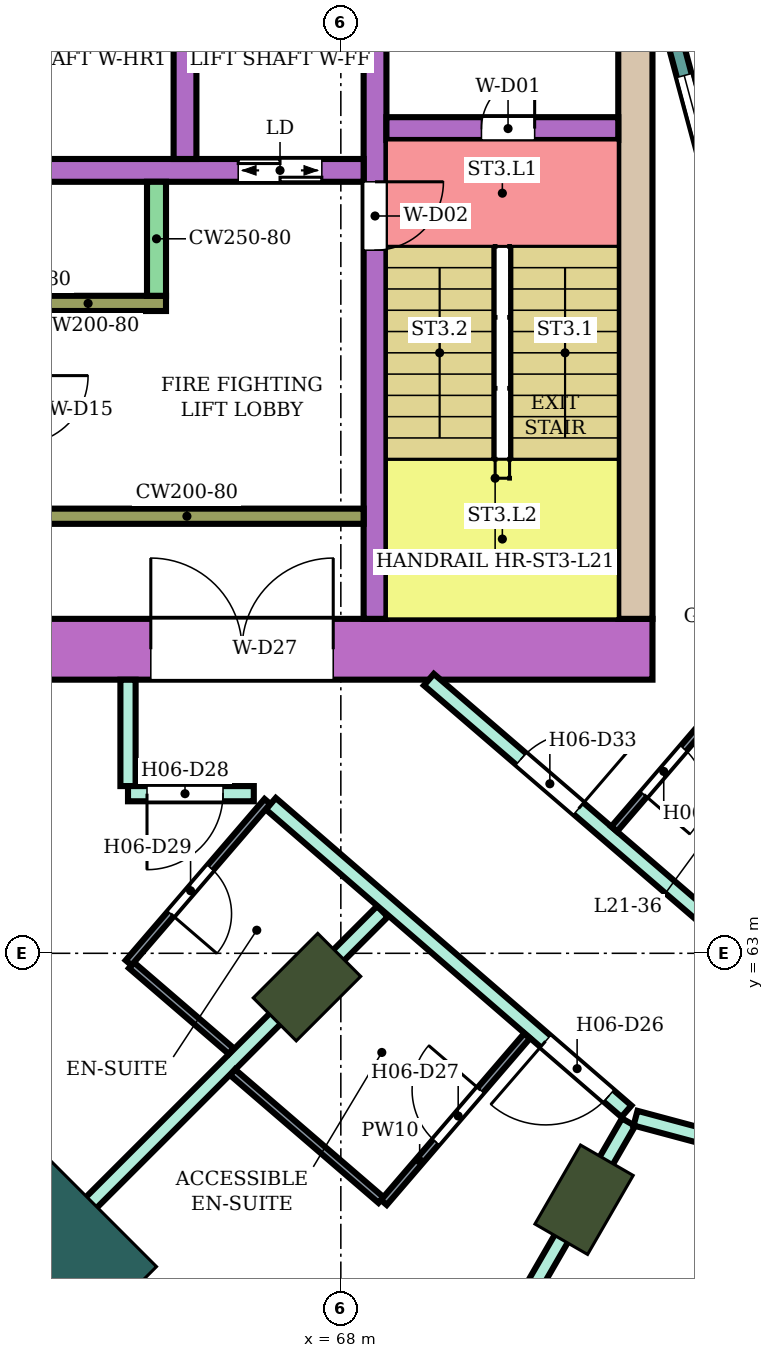
"""IFC4 building model, lengths in metres.
Left out: names, types, materials, properties, quantities, classifications, styles, units other than length and angle.
Written with IfcOpenShell. Run it as: python <this file> out.ifc"""

import sys

from ifc_helpers import new_model, si_unit, direction, frame, frame_2d, origin, origin_2d, place, context, subcontext, project, spatial, rectangle, extrude, element, fill, save


model = new_model("IFC4")
c1 = context("Model", 3, precision=1e-05, world=origin(), true_north=direction((0.0, 1.0)))
c2 = subcontext(c1, "Body", "Model", "MODEL_VIEW")
j1 = project(units=[si_unit("LENGTHUNIT", "METRE"), si_unit("PLANEANGLEUNIT", "RADIAN")], contexts=[c1])
p1 = place(None, origin())
s1 = spatial("IfcSite", under=j1, at=p1, CompositionType="ELEMENT")
p2 = place(p1, origin())
s2 = spatial("IfcBuilding", under=s1, at=p2, CompositionType="ELEMENT")
p3 = place(p2, frame((0.0, 0.0, 93.8)))
s3 = spatial("IfcBuildingStorey", under=s2, at=p3, CompositionType="ELEMENT", Elevation=93.8)
for number, where, z_axis, x_axis in (
    (1, (67.555, 62.555, 0.0), (0.0, 0.0, 1.0), (-0.707, -0.707, 0.0)),
    (2, (71.2, 59.758, 0.0), (0.0, 0.0, 1.0), (-0.5, -0.866, 0.0)),
):
    element("IfcColumn", number, at=place(p3, frame(where, z_axis=z_axis, x_axis=x_axis)), inside=s3, PredefinedType="COLUMN", context=c2, shape_type="SweptSolid", body=[
        extrude(rectangle(XDim=1.2, YDim=0.8, at=origin_2d()), origin(), (0.0, 0.0, 1.0), 3.8),
    ])
p4 = place(p3, frame((64.09, 59.09, 0.0), z_axis=(0.0, 0.0, 1.0), x_axis=(-0.707106781187, -0.707106781187, 0.0)))
e3 = element("IfcColumn", 3, at=p4, inside=s3, PredefinedType="COLUMN", context=c2, shape_type="SweptSolid", body=[
    extrude(rectangle(XDim=1.8, YDim=2.4, at=origin_2d()), origin(), (0.0, 0.0, 1.0), 3.8),
])
p5 = place(p3, frame((72.1, 67.0, 0.0), z_axis=(0.0, 0.0, 1.0), x_axis=(-1.0, 0.0, 0.0)))
e4 = element("IfcWall", 4, at=p5, inside=s3, PredefinedType="SHEAR", context=c2, shape_type="SweptSolid", body=[
    extrude(rectangle(XDim=14.7, YDim=0.8, at=frame_2d((7.35, 0.0))), origin(), (0.0, 0.0, 1.0), 3.48),
])
p6 = place(p5, frame((4.2, 0.0, 0.0)))
e5 = element("IfcOpeningElement", 5, at=p6, cuts=e4, PredefinedType="OPENING", context=c2, shape_type="SweptSolid", body=[
    extrude(rectangle(XDim=2.4, YDim=2.4, at=frame_2d((1.2, 1.2))), frame((0.0, 0.41, 0.0), z_axis=(0.0, -1.0, 0.0), x_axis=(1.0, 0.0, 0.0)), (0.0, 0.0, 1.0), 0.82),
])
p7 = place(p3, frame((71.875, 75.0, 0.0), z_axis=(0.0, 0.0, 1.0), x_axis=(0.0, -1.0, 0.0)))
e6 = element("IfcWall", 6, at=p7, inside=s3, PredefinedType="SHEAR", context=c2, shape_type="SweptSolid", body=[
    extrude(rectangle(XDim=7.6, YDim=0.45, at=frame_2d((3.8, 0.0))), origin(), (0.0, 0.0, 1.0), 3.48),
])
p8 = place(p3, frame((68.45, 75.0, 0.0), z_axis=(0.0, 0.0, 1.0), x_axis=(0.0, -1.0, 0.0)))
e7 = element("IfcWall", 7, at=p8, inside=s3, PredefinedType="SHEAR", context=c2, shape_type="SweptSolid", body=[
    extrude(rectangle(XDim=7.6, YDim=0.3, at=frame_2d((3.8, 0.0))), origin(), (0.0, 0.0, 1.0), 3.48),
])
p9 = place(p8, frame((1.85, 0.0, 0.0)))
e8 = element("IfcOpeningElement", 8, at=p9, cuts=e7, PredefinedType="OPENING", context=c2, shape_type="SweptSolid", body=[
    extrude(rectangle(XDim=0.9, YDim=2.1, at=frame_2d((0.45, 1.05))), frame((0.0, 0.16, 0.0), z_axis=(0.0, -1.0, 0.0), x_axis=(1.0, 0.0, 0.0)), (0.0, 0.0, 1.0), 0.32),
])
p10 = place(p3, frame((71.65, 73.85, 0.0), z_axis=(0.0, 0.0, 1.0), x_axis=(-1.0, 0.0, 0.0)))
e9 = element("IfcWall", 9, at=p10, inside=s3, PredefinedType="SHEAR", context=c2, shape_type="SweptSolid", body=[
    extrude(rectangle(XDim=3.05, YDim=0.3, at=frame_2d((1.525, 0.0))), origin(), (0.0, 0.0, 1.0), 3.48),
])
p11 = place(p10, frame((1.1, 0.0, 0.0)))
e10 = element("IfcOpeningElement", 10, at=p11, cuts=e9, PredefinedType="OPENING", context=c2, shape_type="SweptSolid", body=[
    extrude(rectangle(XDim=0.7, YDim=2.0, at=frame_2d((0.35, 1.0))), frame((0.0, 0.16, 0.0), z_axis=(0.0, -1.0, 0.0), x_axis=(1.0, 0.0, 0.0)), (0.0, 0.0, 1.0), 0.32),
])
p12 = place(p3, frame((68.3, 73.3, 0.0), z_axis=(0.0, 0.0, 1.0), x_axis=(-1.0, 0.0, 0.0)))
e11 = element("IfcWall", 11, at=p12, inside=s3, PredefinedType="SHEAR", context=c2, shape_type="SweptSolid", body=[
    extrude(rectangle(XDim=10.9, YDim=0.3, at=frame_2d((5.45, 0.0))), origin(), (0.0, 0.0, 1.0), 3.48),
])
p13 = place(p12, frame((0.55, 0.0, 0.0)))
e12 = element("IfcOpeningElement", 12, at=p13, cuts=e11, PredefinedType="OPENING", context=c2, shape_type="SweptSolid", body=[
    extrude(rectangle(XDim=1.1, YDim=2.1, at=frame_2d((0.55, 1.05))), frame((0.0, 0.16, 0.0), z_axis=(0.0, -1.0, 0.0), x_axis=(1.0, 0.0, 0.0)), (0.0, 0.0, 1.0), 0.32),
])
p14 = place(p12, frame((8.1, 0.0, 0.0)))
e13 = element("IfcOpeningElement", 13, at=p14, cuts=e11, PredefinedType="OPENING", context=c2, shape_type="SweptSolid", body=[
    extrude(rectangle(XDim=1.0, YDim=2.1, at=frame_2d((0.5, 1.05))), frame((0.0, 0.16, 0.0), z_axis=(0.0, -1.0, 0.0), x_axis=(1.0, 0.0, 0.0)), (0.0, 0.0, 1.0), 0.32),
])
p15 = place(p3, frame((65.95, 76.0, 0.0), z_axis=(0.0, 0.0, 1.0), x_axis=(0.0, -1.0, 0.0)))
e14 = element("IfcWall", 14, at=p15, inside=s3, PredefinedType="SHEAR", context=c2, shape_type="SweptSolid", body=[
    extrude(rectangle(XDim=2.55, YDim=0.3, at=frame_2d((1.275, 0.0))), origin(), (0.0, 0.0, 1.0), 3.48),
])
p16 = place(p3, frame((68.3, 68.75, 0.0), z_axis=(0.0, 0.0, 1.0), x_axis=(-1.0, 0.0, 0.0)))
e15 = element("IfcWall", 15, at=p16, inside=s3, PredefinedType="SHEAR", context=c2, shape_type="SweptSolid", body=[
    extrude(rectangle(XDim=4.65, YDim=0.2, at=frame_2d((2.325, 0.0))), origin(), (0.0, 0.0, 1.0), 3.48),
])
p17 = place(p3, frame((65.7, 71.55, 0.0), z_axis=(0.0, 0.0, 1.0), x_axis=(-1.0, 0.0, 0.0)))
e16 = element("IfcWall", 16, at=p17, inside=s3, PredefinedType="SHEAR", context=c2, shape_type="SweptSolid", body=[
    extrude(rectangle(XDim=2.05, YDim=0.2, at=frame_2d((1.025, 0.0))), origin(), (0.0, 0.0, 1.0), 3.48),
])
p18 = place(p3, frame((65.575, 73.15, 0.0), z_axis=(0.0, 0.0, 1.0), x_axis=(0.0, -1.0, 0.0)))
e17 = element("IfcWall", 17, at=p18, inside=s3, PredefinedType="SHEAR", context=c2, shape_type="SweptSolid", body=[
    extrude(rectangle(XDim=1.5, YDim=0.25, at=frame_2d((0.75, 0.0))), origin(), (0.0, 0.0, 1.0), 3.48),
])
p19 = place(p3, frame((72.396, 75.0, 0.0), z_axis=(0.0, 0.0, 1.0), x_axis=(0.258789828301, -0.965933654434, 0.0)))
e18 = element("IfcWall", 18, at=p19, inside=s3, PredefinedType="NOTDEFINED", context=c2, shape_type="SweptSolid", body=[
    extrude(rectangle(XDim=3.936, YDim=0.2, at=frame_2d((1.968, 0.0))), origin(), (0.0, 0.0, 1.0), 3.8),
])
p20 = place(p19, frame((0.468, 0.0, 0.9)))
e19 = element("IfcOpeningElement", 19, at=p20, cuts=e18, PredefinedType="OPENING", context=c2, shape_type="SweptSolid", body=[
    extrude(rectangle(XDim=3.0, YDim=2.3, at=frame_2d((1.5, 1.15))), frame((0.0, 0.11, 0.0), z_axis=(0.0, -1.0, 0.0), x_axis=(1.0, 0.0, 0.0)), (0.0, 0.0, 1.0), 0.22),
])
p21 = place(p3, frame((63.594, 58.598, 0.0), z_axis=(0.0, 0.0, 1.0), x_axis=(0.707228748718, 0.706984792613, 0.0)))
e20 = element("IfcWall", 20, at=p21, inside=s3, PredefinedType="PARTITIONING", context=c2, shape_type="SweptSolid", body=[
    extrude(rectangle(XDim=7.005, YDim=0.2, at=frame_2d((3.503, 0.0))), origin(), (0.0, 0.0, 1.0), 3.35),
])
p22 = place(p3, frame((65.2, 65.2, 0.0), z_axis=(0.0, 0.0, 1.0), x_axis=(0.0, 1.0, 0.0)))
e21 = element("IfcWall", 21, at=p22, inside=s3, PredefinedType="PARTITIONING", context=c2, shape_type="SweptSolid", body=[
    extrude(rectangle(XDim=1.399, YDim=0.2, at=frame_2d((0.7, 0.0))), origin(), (0.0, 0.0, 1.0), 3.35),
])
p23 = place(p3, frame((65.2, 65.1, 0.0), z_axis=(0.0, 0.0, 1.0), x_axis=(1.0, 0.0, 0.0)))
e22 = element("IfcWall", 22, at=p23, inside=s3, PredefinedType="PARTITIONING", context=c2, shape_type="SweptSolid", body=[
    extrude(rectangle(XDim=1.655, YDim=0.2, at=frame_2d((0.828, 0.0))), origin(), (0.0, 0.0, 1.0), 3.35),
])
p24 = place(p23, frame((0.25, 0.0, 0.0)))
e23 = element("IfcOpeningElement", 23, at=p24, cuts=e22, PredefinedType="OPENING", context=c2, shape_type="SweptSolid", body=[
    extrude(rectangle(XDim=1.0, YDim=2.1, at=frame_2d((0.5, 1.05))), frame((0.0, 0.11, 0.0), z_axis=(0.0, -1.0, 0.0), x_axis=(1.0, 0.0, 0.0)), (0.0, 0.0, 1.0), 0.22),
])
p25 = place(p3, frame((67.079, 64.968, 0.0), z_axis=(0.0, 0.0, 1.0), x_axis=(0.756371089567, -0.654142778656, 0.0)))
e24 = element("IfcWall", 24, at=p25, inside=s3, PredefinedType="PARTITIONING", context=c2, shape_type="SweptSolid", body=[
    extrude(rectangle(XDim=6.185, YDim=0.2, at=frame_2d((3.093, 0.0))), origin(), (0.0, 0.0, 1.0), 3.35),
])
p26 = place(p25, frame((4.778, 0.0, 0.0)))
e25 = element("IfcOpeningElement", 25, at=p26, cuts=e24, PredefinedType="OPENING", context=c2, shape_type="SweptSolid", body=[
    extrude(rectangle(XDim=1.1, YDim=2.1, at=frame_2d((0.55, 1.05))), frame((0.0, 0.11, 0.0), z_axis=(0.0, -1.0, 0.0), x_axis=(1.0, 0.0, 0.0)), (0.0, 0.0, 1.0), 0.22),
])
p27 = place(p3, frame((67.096, 52.662, 0.0), z_axis=(0.0, 0.0, 1.0), x_axis=(0.500222922337, 0.865896661253, 0.0)))
e26 = element("IfcWall", 26, at=p27, inside=s3, PredefinedType="PARTITIONING", context=c2, shape_type="SweptSolid", body=[
    extrude(rectangle(XDim=9.374, YDim=0.2, at=frame_2d((4.687, 0.0))), origin(), (0.0, 0.0, 1.0), 3.35),
])
p28 = place(p3, frame((69.158, 66.6, 0.0), z_axis=(0.0, 0.0, 1.0), x_axis=(0.757976058094, -0.652282373943, 0.0)))
e27 = element("IfcWall", 27, at=p28, inside=s3, PredefinedType="PARTITIONING", context=c2, shape_type="SweptSolid", body=[
    extrude(rectangle(XDim=5.16, YDim=0.2, at=frame_2d((2.58, 0.0))), origin(), (0.0, 0.0, 1.0), 3.35),
])
p29 = place(p28, frame((1.6, 0.0, 0.0)))
e28 = element("IfcOpeningElement", 28, at=p29, cuts=e27, PredefinedType="OPENING", context=c2, shape_type="SweptSolid", body=[
    extrude(rectangle(XDim=1.0, YDim=2.1, at=frame_2d((0.5, 1.05))), frame((0.0, 0.11, 0.0), z_axis=(0.0, -1.0, 0.0), x_axis=(1.0, 0.0, 0.0)), (0.0, 0.0, 1.0), 0.22),
])
p30 = place(p3, frame((71.877, 60.831, 0.0), z_axis=(0.0, 0.0, 1.0), x_axis=(0.965905026676, -0.258896657842, 0.0)))
e29 = element("IfcWall", 29, at=p30, inside=s3, PredefinedType="PARTITIONING", context=c2, shape_type="SweptSolid", body=[
    extrude(rectangle(XDim=8.36, YDim=0.2, at=frame_2d((4.18, 0.0))), origin(), (0.0, 0.0, 1.0), 3.35),
])
p31 = place(p30, frame((4.655, 0.0, 0.0)))
e30 = element("IfcOpeningElement", 30, at=p31, cuts=e29, PredefinedType="OPENING", context=c2, shape_type="SweptSolid", body=[
    extrude(rectangle(XDim=1.8, YDim=2.1, at=frame_2d((0.9, 1.05))), frame((0.0, 0.11, 0.0), z_axis=(0.0, -1.0, 0.0), x_axis=(1.0, 0.0, 0.0)), (0.0, 0.0, 1.0), 0.22),
])
p32 = place(p3, frame((65.246, 62.842, 0.0), z_axis=(0.0, 0.0, 1.0), x_axis=(0.758030338995, -0.652219292234, 0.0)))
e31 = element("IfcWall", 31, at=p32, inside=s3, PredefinedType="PARTITIONING", context=c2, shape_type="SweptSolid", body=[
    extrude(rectangle(XDim=1.73, YDim=0.1, at=frame_2d((0.865, 0.0))), origin(), (0.0, 0.0, 1.0), 3.35),
])
p33 = place(p3, frame((65.208, 62.875, 0.0), z_axis=(0.0, 0.0, 1.0), x_axis=(0.65205430601, 0.758172264076, 0.0)))
e32 = element("IfcWall", 32, at=p33, inside=s3, PredefinedType="PARTITIONING", context=c2, shape_type="SweptSolid", body=[
    extrude(rectangle(XDim=2.8, YDim=0.1, at=frame_2d((1.4, 0.0))), origin(), (0.0, 0.0, 1.0), 3.35),
])
p34 = place(p33, frame((0.85, 0.0, 0.0)))
e33 = element("IfcOpeningElement", 33, at=p34, cuts=e32, PredefinedType="OPENING", context=c2, shape_type="SweptSolid", body=[
    extrude(rectangle(XDim=0.8, YDim=2.1, at=frame_2d((0.4, 1.05))), frame((0.0, 0.06, 0.0), z_axis=(0.0, -1.0, 0.0), x_axis=(1.0, 0.0, 0.0)), (0.0, 0.0, 1.0), 0.12),
])
p35 = place(p3, frame((66.576, 61.435, 0.0), z_axis=(0.0, 0.0, 1.0), x_axis=(0.757970550281, -0.652288774169, 0.0)))
e34 = element("IfcWall", 34, at=p35, inside=s3, PredefinedType="PARTITIONING", context=c2, shape_type="SweptSolid", body=[
    extrude(rectangle(XDim=2.576, YDim=0.1, at=frame_2d((1.288, 0.0))), origin(), (0.0, 0.0, 1.0), 3.35),
])
p36 = place(p3, frame((68.566, 59.722, 0.0), z_axis=(0.0, 0.0, 1.0), x_axis=(0.65193146671, 0.758277892803, 0.0)))
e35 = element("IfcWall", 35, at=p36, inside=s3, PredefinedType="PARTITIONING", context=c2, shape_type="SweptSolid", body=[
    extrude(rectangle(XDim=2.89, YDim=0.1, at=frame_2d((1.445, 0.0))), origin(), (0.0, 0.0, 1.0), 3.35),
])
p37 = place(p36, frame((1.05, 0.0, 0.0)))
e36 = element("IfcOpeningElement", 36, at=p37, cuts=e35, PredefinedType="OPENING", context=c2, shape_type="SweptSolid", body=[
    extrude(rectangle(XDim=0.9, YDim=2.1, at=frame_2d((0.45, 1.05))), frame((0.0, 0.06, 0.0), z_axis=(0.0, -1.0, 0.0), x_axis=(1.0, 0.0, 0.0)), (0.0, 0.0, 1.0), 0.12),
])
p38 = place(p3, frame((71.596, 64.635, 0.0), z_axis=(0.0, 0.0, 1.0), x_axis=(0.652285007511, 0.757973791748, 0.0)))
e37 = element("IfcWall", 37, at=p38, inside=s3, PredefinedType="PARTITIONING", context=c2, shape_type="SweptSolid", body=[
    extrude(rectangle(XDim=2.65, YDim=0.1, at=frame_2d((1.325, 0.0))), origin(), (0.0, 0.0, 1.0), 3.35),
])
p39 = place(p38, frame((0.6, 0.0, 0.0)))
e38 = element("IfcOpeningElement", 38, at=p39, cuts=e37, PredefinedType="OPENING", context=c2, shape_type="SweptSolid", body=[
    extrude(rectangle(XDim=0.8, YDim=2.1, at=frame_2d((0.4, 1.05))), frame((0.0, 0.06, 0.0), z_axis=(0.0, -1.0, 0.0), x_axis=(1.0, 0.0, 0.0)), (0.0, 0.0, 1.0), 0.12),
])
p40 = place(p20, origin())
e39 = element("IfcWindow", 39, at=p40, inside=s3, PartitioningType="SINGLE_PANEL", PredefinedType="WINDOW", context=c2, shape_type="SweptSolid", body=[
    extrude(rectangle(XDim=3.0, YDim=2.3, at=frame_2d((1.5, 1.15))), frame((0.0, 0.03, 0.0), z_axis=(0.0, -1.0, 0.0), x_axis=(1.0, 0.0, 0.0)), (0.0, 0.0, 1.0), 0.06),
])
fill(e19, e39)
p41 = place(p26, frame((1.1, 0.0, 0.0), z_axis=(0.0, 0.0, 1.0), x_axis=(-1.0, 0.0, 0.0)))
e40 = element("IfcDoor", 40, at=p41, inside=s3, OperationType="SINGLE_SWING_RIGHT", PredefinedType="DOOR", context=c2, shape_type="SweptSolid", body=[
    extrude(rectangle(XDim=1.1, YDim=2.1, at=frame_2d((0.55, 1.05))), frame((0.0, 0.025, 0.0), z_axis=(0.0, -1.0, 0.0), x_axis=(1.0, 0.0, 0.0)), (0.0, 0.0, 1.0), 0.05),
])
fill(e25, e40)
p42 = place(p37, origin())
e41 = element("IfcDoor", 41, at=p42, inside=s3, OperationType="SINGLE_SWING_RIGHT", PredefinedType="DOOR", context=c2, shape_type="SweptSolid", body=[
    extrude(rectangle(XDim=0.9, YDim=2.1, at=frame_2d((0.45, 1.05))), frame((0.0, 0.025, 0.0), z_axis=(0.0, -1.0, 0.0), x_axis=(1.0, 0.0, 0.0)), (0.0, 0.0, 1.0), 0.05),
])
fill(e36, e41)
p43 = place(p24, frame((1.0, 0.0, 0.0), z_axis=(0.0, 0.0, 1.0), x_axis=(-1.0, 0.0, 0.0)))
e42 = element("IfcDoor", 42, at=p43, inside=s3, OperationType="SINGLE_SWING_RIGHT", PredefinedType="DOOR", context=c2, shape_type="SweptSolid", body=[
    extrude(rectangle(XDim=1.0, YDim=2.1, at=frame_2d((0.5, 1.05))), frame((0.0, 0.025, 0.0), z_axis=(0.0, -1.0, 0.0), x_axis=(1.0, 0.0, 0.0)), (0.0, 0.0, 1.0), 0.05),
])
fill(e23, e42)
p44 = place(p34, frame((0.8, 0.0, 0.0), z_axis=(0.0, 0.0, 1.0), x_axis=(-1.0, 0.0, 0.0)))
e43 = element("IfcDoor", 43, at=p44, inside=s3, OperationType="SINGLE_SWING_RIGHT", PredefinedType="DOOR", context=c2, shape_type="SweptSolid", body=[
    extrude(rectangle(XDim=0.8, YDim=2.1, at=frame_2d((0.4, 1.05))), frame((0.0, 0.025, 0.0), z_axis=(0.0, -1.0, 0.0), x_axis=(1.0, 0.0, 0.0)), (0.0, 0.0, 1.0), 0.05),
])
fill(e33, e43)
p45 = place(p29, origin())
e44 = element("IfcDoor", 44, at=p45, inside=s3, OperationType="SINGLE_SWING_RIGHT", PredefinedType="DOOR", context=c2, shape_type="SweptSolid", body=[
    extrude(rectangle(XDim=1.0, YDim=2.1, at=frame_2d((0.5, 1.05))), frame((0.0, 0.025, 0.0), z_axis=(0.0, -1.0, 0.0), x_axis=(1.0, 0.0, 0.0)), (0.0, 0.0, 1.0), 0.05),
])
fill(e28, e44)
p46 = place(p39, frame((0.8, 0.0, 0.0), z_axis=(0.0, 0.0, 1.0), x_axis=(-1.0, 0.0, 0.0)))
e45 = element("IfcDoor", 45, at=p46, inside=s3, OperationType="SINGLE_SWING_RIGHT", PredefinedType="DOOR", context=c2, shape_type="SweptSolid", body=[
    extrude(rectangle(XDim=0.8, YDim=2.1, at=frame_2d((0.4, 1.05))), frame((0.0, 0.025, 0.0), z_axis=(0.0, -1.0, 0.0), x_axis=(1.0, 0.0, 0.0)), (0.0, 0.0, 1.0), 0.05),
])
fill(e38, e45)
p47 = place(p11, frame((0.7, 0.0, 0.0), z_axis=(0.0, 0.0, 1.0), x_axis=(-1.0, 0.0, 0.0)))
e46 = element("IfcDoor", 46, at=p47, inside=s3, OperationType="SINGLE_SWING_RIGHT", PredefinedType="DOOR", context=c2, shape_type="SweptSolid", body=[
    extrude(rectangle(XDim=0.7, YDim=2.0, at=frame_2d((0.35, 1.0))), frame((0.0, 0.025, 0.0), z_axis=(0.0, -1.0, 0.0), x_axis=(1.0, 0.0, 0.0)), (0.0, 0.0, 1.0), 0.05),
])
fill(e10, e46)
p48 = place(p9, origin())
e47 = element("IfcDoor", 47, at=p48, inside=s3, OperationType="SINGLE_SWING_LEFT", PredefinedType="DOOR", context=c2, shape_type="SweptSolid", body=[
    extrude(rectangle(XDim=0.9, YDim=2.1, at=frame_2d((0.45, 1.05))), frame((0.0, 0.025, 0.0), z_axis=(0.0, -1.0, 0.0), x_axis=(1.0, 0.0, 0.0)), (0.0, 0.0, 1.0), 0.05),
])
fill(e8, e47)
p49 = place(p13, origin())
e48 = element("IfcDoor", 48, at=p49, inside=s3, OperationType="DOUBLE_DOOR_SLIDING", PredefinedType="DOOR", context=c2, shape_type="SweptSolid", body=[
    extrude(rectangle(XDim=1.1, YDim=2.1, at=frame_2d((0.55, 1.05))), frame((0.0, 0.025, 0.0), z_axis=(0.0, -1.0, 0.0), x_axis=(1.0, 0.0, 0.0)), (0.0, 0.0, 1.0), 0.05),
])
fill(e12, e48)
p50 = place(p6, frame((2.4, 0.0, 0.0), z_axis=(0.0, 0.0, 1.0), x_axis=(-1.0, 0.0, 0.0)))
e49 = element("IfcDoor", 49, at=p50, inside=s3, OperationType="DOUBLE_DOOR_SINGLE_SWING", PredefinedType="DOOR", context=c2, shape_type="SweptSolid", body=[
    extrude(rectangle(XDim=2.4, YDim=2.4, at=frame_2d((1.2, 1.2))), frame((0.0, 0.025, 0.0), z_axis=(0.0, -1.0, 0.0), x_axis=(1.0, 0.0, 0.0)), (0.0, 0.0, 1.0), 0.05),
])
fill(e5, e49)
save(model, sys.argv[1])
